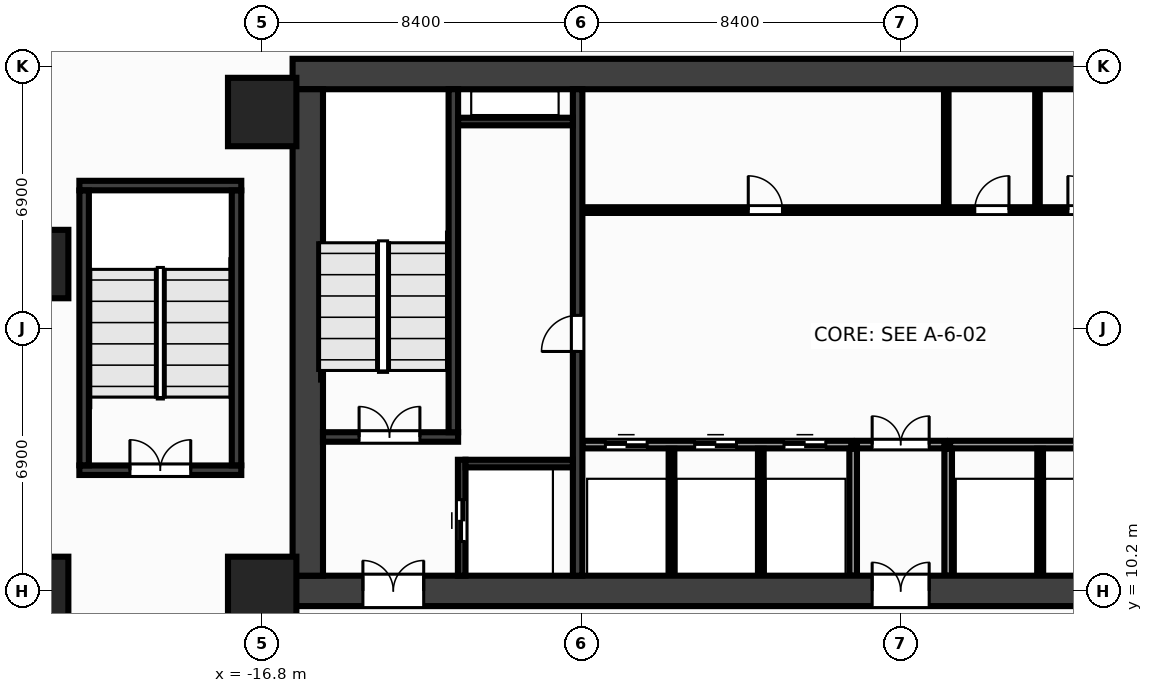
"""IFC4 building model, lengths in metres.
Left out: names, types, materials, properties, quantities, classifications, styles, units other than length and angle.
Written with IfcOpenShell. Run it as: python <this file> out.ifc"""

import sys

from ifc_helpers import new_model, si_unit, direction, frame, frame_2d, origin, origin_2d, place, context, subcontext, project, spatial, rectangle, extrude, source, transform, mapped, element, fill, save


model = new_model("IFC4")
c1 = context("Model", 3, precision=1e-05, world=origin(), true_north=direction((0.0, 1.0)))
c2 = subcontext(c1, "Body", "Model", "MODEL_VIEW")
j1 = project(units=[si_unit("LENGTHUNIT", "METRE"), si_unit("PLANEANGLEUNIT", "RADIAN")], contexts=[c1])
p1 = place(None, origin())
s1 = spatial("IfcSite", under=j1, at=p1, CompositionType="ELEMENT")
p2 = place(p1, origin())
s2 = spatial("IfcBuilding", under=s1, at=p2, CompositionType="ELEMENT")
p3 = place(p2, frame((0.0, 0.0, 14.3)))
s3 = spatial("IfcBuildingStorey", under=s2, at=p3, CompositionType="ELEMENT", Elevation=14.3)
m1 = source(origin(), c2, "Body", "SweptSolid", [
    extrude(rectangle(XDim=32.0, YDim=0.8, at=frame_2d((16.0, 0.0))), origin(), (0.0, 0.0, 1.0), 4.65),
])
p4 = place(p3, frame((-16.0, 23.8, 0.0), z_axis=(0.0, 0.0, 1.0), x_axis=(1.0, 0.0, 0.0)))
e1 = element("IfcWall", 1, at=p4, inside=s3, PredefinedType="SHEAR", context=c2, shape_type="MappedRepresentation", body=[
    mapped(m1, transform((0.0, 0.0, 0.0), x_axis=(1.0, 0.0, 0.0), y_axis=(0.0, 1.0, 0.0), z_axis=(0.0, 0.0, 1.0), scale=1.0)),
])
p5 = place(p3, frame((-16.0, 10.2, 0.0), z_axis=(0.0, 0.0, 1.0), x_axis=(1.0, 0.0, 0.0)))
e2 = element("IfcWall", 2, at=p5, inside=s3, PredefinedType="SHEAR", context=c2, shape_type="MappedRepresentation", body=[
    mapped(m1, transform((0.0, 0.0, 0.0), x_axis=(1.0, 0.0, 0.0), y_axis=(0.0, 1.0, 0.0), z_axis=(0.0, 0.0, 1.0), scale=1.0)),
])
p6 = place(p5, frame((1.85, 0.0, 0.0)))
e3 = element("IfcOpeningElement", 3, at=p6, cuts=e2, PredefinedType="OPENING", context=c2, shape_type="SweptSolid", body=[
    extrude(rectangle(XDim=1.6, YDim=2.15, at=frame_2d((0.8, 1.075))), frame((0.0, 0.412, 0.0), z_axis=(0.0, -1.0, 0.0), x_axis=(1.0, 0.0, 0.0)), (0.0, 0.0, 1.0), 0.824),
])
p7 = place(p5, frame((28.55, 0.0, 0.0)))
e4 = element("IfcOpeningElement", 4, at=p7, cuts=e2, PredefinedType="OPENING", context=c2, shape_type="SweptSolid", body=[
    extrude(rectangle(XDim=1.6, YDim=2.15, at=frame_2d((0.8, 1.075))), frame((0.0, 0.412, 0.0), z_axis=(0.0, -1.0, 0.0), x_axis=(1.0, 0.0, 0.0)), (0.0, 0.0, 1.0), 0.824),
])
p8 = place(p5, frame((15.25, 0.0, 0.0)))
e5 = element("IfcOpeningElement", 5, at=p8, cuts=e2, PredefinedType="OPENING", context=c2, shape_type="SweptSolid", body=[
    extrude(rectangle(XDim=1.5, YDim=2.2, at=frame_2d((0.75, 1.1))), frame((0.0, 0.412, 0.0), z_axis=(0.0, -1.0, 0.0), x_axis=(1.0, 0.0, 0.0)), (0.0, 0.0, 1.0), 0.824),
])
m2 = source(origin(), c2, "Body", "SweptSolid", [
    extrude(rectangle(XDim=12.8, YDim=0.8, at=frame_2d((6.4, 0.0))), origin(), (0.0, 0.0, 1.0), 4.65),
])
p9 = place(p3, frame((-15.6, 10.6, 0.0), z_axis=(0.0, 0.0, 1.0), x_axis=(0.0, 1.0, 0.0)))
e6 = element("IfcWall", 6, at=p9, inside=s3, PredefinedType="SHEAR", context=c2, shape_type="MappedRepresentation", body=[
    mapped(m2, transform((0.0, 0.0, 0.0), x_axis=(1.0, 0.0, 0.0), y_axis=(0.0, 1.0, 0.0), z_axis=(0.0, 0.0, 1.0), scale=1.0)),
])
m3 = source(origin(), c2, "Body", "SweptSolid", [
    extrude(rectangle(XDim=12.8, YDim=0.25, at=frame_2d((6.4, 0.0))), origin(), (0.0, 0.0, 1.0), 4.65),
])
p10 = place(p3, frame((-8.5, 10.6, 0.0), z_axis=(0.0, 0.0, 1.0), x_axis=(0.0, 1.0, 0.0)))
e7 = element("IfcWall", 7, at=p10, inside=s3, PredefinedType="SHEAR", context=c2, shape_type="MappedRepresentation", body=[
    mapped(m3, transform((0.0, 0.0, 0.0), x_axis=(1.0, 0.0, 0.0), y_axis=(0.0, 1.0, 0.0), z_axis=(0.0, 0.0, 1.0), scale=1.0)),
])
p11 = place(p10, frame((5.9, 0.0, 0.0)))
e8 = element("IfcOpeningElement", 8, at=p11, cuts=e7, PredefinedType="OPENING", context=c2, shape_type="SweptSolid", body=[
    extrude(rectangle(XDim=0.95, YDim=2.15, at=frame_2d((0.475, 1.075))), frame((0.0, 0.137, 0.0), z_axis=(0.0, -1.0, 0.0), x_axis=(1.0, 0.0, 0.0)), (0.0, 0.0, 1.0), 0.274),
])
m4 = source(origin(), c2, "Body", "SweptSolid", [
    extrude(rectangle(XDim=3.555, YDim=0.25, at=frame_2d((1.777, 0.0))), origin(), (0.0, 0.0, 1.0), 4.65),
])
p12 = place(p3, frame((-15.2, 14.25, 0.0), z_axis=(0.0, 0.0, 1.0), x_axis=(1.0, 0.0, 0.0)))
e9 = element("IfcWall", 9, at=p12, inside=s3, PredefinedType="SHEAR", context=c2, shape_type="MappedRepresentation", body=[
    mapped(m4, transform((0.0, 0.0, 0.0), x_axis=(1.0, 0.0, 0.0), y_axis=(0.0, 1.0, 0.0), z_axis=(0.0, 0.0, 1.0), scale=1.0)),
])
p13 = place(p12, frame((0.95, 0.0, 0.0)))
e10 = element("IfcOpeningElement", 10, at=p13, cuts=e9, PredefinedType="OPENING", context=c2, shape_type="SweptSolid", body=[
    extrude(rectangle(XDim=1.6, YDim=2.15, at=frame_2d((0.8, 1.075))), frame((0.0, 0.137, 0.0), z_axis=(0.0, -1.0, 0.0), x_axis=(1.0, 0.0, 0.0)), (0.0, 0.0, 1.0), 0.274),
])
m5 = source(origin(), c2, "Body", "SweptSolid", [
    extrude(rectangle(XDim=9.025, YDim=0.25, at=frame_2d((4.512, 0.0))), origin(), (0.0, 0.0, 1.0), 4.65),
])
p14 = place(p3, frame((-11.77, 14.375, 0.0), z_axis=(0.0, 0.0, 1.0), x_axis=(0.0, 1.0, 0.0)))
e11 = element("IfcWall", 11, at=p14, inside=s3, PredefinedType="SHEAR", context=c2, shape_type="MappedRepresentation", body=[
    mapped(m5, transform((0.0, 0.0, 0.0), x_axis=(1.0, 0.0, 0.0), y_axis=(0.0, 1.0, 0.0), z_axis=(0.0, 0.0, 1.0), scale=1.0)),
])
m6 = source(origin(), c2, "Body", "SweptSolid", [
    extrude(rectangle(XDim=3.05, YDim=0.2, at=frame_2d((1.525, 0.0))), origin(), (0.0, 0.0, 1.0), 4.65),
])
p15 = place(p3, frame((-11.55, 10.6, 0.0), z_axis=(0.0, 0.0, 1.0), x_axis=(0.0, 1.0, 0.0)))
e12 = element("IfcWall", 12, at=p15, inside=s3, PredefinedType="SHEAR", context=c2, shape_type="MappedRepresentation", body=[
    mapped(m6, transform((0.0, 0.0, 0.0), x_axis=(1.0, 0.0, 0.0), y_axis=(0.0, 1.0, 0.0), z_axis=(0.0, 0.0, 1.0), scale=1.0)),
])
p16 = place(p15, frame((0.9, 0.0, 0.0)))
e13 = element("IfcOpeningElement", 13, at=p16, cuts=e12, PredefinedType="OPENING", context=c2, shape_type="SweptSolid", body=[
    extrude(rectangle(XDim=1.1, YDim=2.15, at=frame_2d((0.55, 1.075))), frame((0.0, 0.112, 0.0), z_axis=(0.0, -1.0, 0.0), x_axis=(1.0, 0.0, 0.0)), (0.0, 0.0, 1.0), 0.224),
])
m7 = source(origin(), c2, "Body", "SweptSolid", [
    extrude(rectangle(XDim=2.825, YDim=0.2, at=frame_2d((1.413, 0.0))), origin(), (0.0, 0.0, 1.0), 4.65),
])
p17 = place(p3, frame((-11.45, 13.55, 0.0), z_axis=(0.0, 0.0, 1.0), x_axis=(1.0, 0.0, 0.0)))
e14 = element("IfcWall", 14, at=p17, inside=s3, PredefinedType="SHEAR", context=c2, shape_type="MappedRepresentation", body=[
    mapped(m7, transform((0.0, 0.0, 0.0), x_axis=(1.0, 0.0, 0.0), y_axis=(0.0, 1.0, 0.0), z_axis=(0.0, 0.0, 1.0), scale=1.0)),
])
m8 = source(origin(), c2, "Body", "SweptSolid", [
    extrude(rectangle(XDim=3.02, YDim=0.2, at=frame_2d((1.51, 0.0))), origin(), (0.0, 0.0, 1.0), 4.65),
])
p18 = place(p3, frame((-11.645, 22.55, 0.0), z_axis=(0.0, 0.0, 1.0), x_axis=(1.0, 0.0, 0.0)))
e15 = element("IfcWall", 15, at=p18, inside=s3, PredefinedType="SHEAR", context=c2, shape_type="MappedRepresentation", body=[
    mapped(m8, transform((0.0, 0.0, 0.0), x_axis=(1.0, 0.0, 0.0), y_axis=(0.0, 1.0, 0.0), z_axis=(0.0, 0.0, 1.0), scale=1.0)),
])
m9 = source(origin(), c2, "Body", "SweptSolid", [
    extrude(rectangle(XDim=4.26, YDim=0.25, at=frame_2d((2.13, 0.0))), origin(), (0.0, 0.0, 1.0), 4.65),
])
p19 = place(p3, frame((-21.61, 20.865, 0.0), z_axis=(0.0, 0.0, 1.0), x_axis=(1.0, 0.0, 0.0)))
e16 = element("IfcWall", 16, at=p19, inside=s3, PredefinedType="SHEAR", context=c2, shape_type="MappedRepresentation", body=[
    mapped(m9, transform((0.0, 0.0, 0.0), x_axis=(1.0, 0.0, 0.0), y_axis=(0.0, 1.0, 0.0), z_axis=(0.0, 0.0, 1.0), scale=1.0)),
])
p20 = place(p3, frame((-21.61, 13.375, 0.0), z_axis=(0.0, 0.0, 1.0), x_axis=(1.0, 0.0, 0.0)))
e17 = element("IfcWall", 17, at=p20, inside=s3, PredefinedType="SHEAR", context=c2, shape_type="MappedRepresentation", body=[
    mapped(m9, transform((0.0, 0.0, 0.0), x_axis=(1.0, 0.0, 0.0), y_axis=(0.0, 1.0, 0.0), z_axis=(0.0, 0.0, 1.0), scale=1.0)),
])
p21 = place(p20, frame((1.33, 0.0, 0.0)))
e18 = element("IfcOpeningElement", 18, at=p21, cuts=e17, PredefinedType="OPENING", context=c2, shape_type="SweptSolid", body=[
    extrude(rectangle(XDim=1.6, YDim=2.15, at=frame_2d((0.8, 1.075))), frame((0.0, 0.137, 0.0), z_axis=(0.0, -1.0, 0.0), x_axis=(1.0, 0.0, 0.0)), (0.0, 0.0, 1.0), 0.274),
])
m10 = source(origin(), c2, "Body", "SweptSolid", [
    extrude(rectangle(XDim=7.23, YDim=0.25, at=frame_2d((3.615, 0.0))), origin(), (0.0, 0.0, 1.0), 4.65),
])
for number, where, z_axis, x_axis in (
    (19, (-21.485, 13.505, 0.0), (0.0, 0.0, 1.0), (0.0, 1.0, 0.0)),
    (20, (-17.475, 13.505, 0.0), (0.0, 0.0, 1.0), (0.0, 1.0, 0.0)),
):
    element("IfcWall", number, at=place(p3, frame(where, z_axis=z_axis, x_axis=x_axis)), inside=s3, PredefinedType="SHEAR", context=c2, shape_type="MappedRepresentation", body=[
        mapped(m10, transform((0.0, 0.0, 0.0), x_axis=(1.0, 0.0, 0.0), y_axis=(0.0, 1.0, 0.0), z_axis=(0.0, 0.0, 1.0), scale=1.0)),
    ])
m11 = source(origin(), c2, "Body", "SweptSolid", [
    extrude(rectangle(XDim=1.8, YDim=1.8, at=origin_2d()), origin(), (0.0, 0.0, 1.0), 4.65),
])
for number, where, z_axis, x_axis in (
    (21, (-16.8, 10.2, 0.0), (0.0, 0.0, 1.0), (1.0, 0.0, 0.0)),
    (22, (-16.8, 22.8, 0.0), (0.0, 0.0, 1.0), (1.0, 0.0, 0.0)),
    (23, (-22.8, 10.2, 0.0), (0.0, 0.0, 1.0), (1.0, 0.0, 0.0)),
    (24, (-22.8, 18.8, 0.0), (0.0, 0.0, 1.0), (1.0, 0.0, 0.0)),
):
    element("IfcColumn", number, at=place(p3, frame(where, z_axis=z_axis, x_axis=x_axis)), inside=s3, PredefinedType="COLUMN", context=c2, shape_type="MappedRepresentation", body=[
        mapped(m11, transform((0.0, 0.0, 0.0), x_axis=(1.0, 0.0, 0.0), y_axis=(0.0, 1.0, 0.0), z_axis=(0.0, 0.0, 1.0), scale=1.0)),
    ])
m12 = source(origin(), c2, "Body", "SweptSolid", [
    extrude(rectangle(XDim=7.07, YDim=0.2, at=frame_2d((3.535, 0.0))), origin(), (0.0, 0.0, 1.0), 4.33),
])
p22 = place(p3, frame((-8.37, 14.05, 0.0), z_axis=(0.0, 0.0, 1.0), x_axis=(1.0, 0.0, 0.0)))
e25 = element("IfcWall", 25, at=p22, inside=s3, PredefinedType="PARTITIONING", context=c2, shape_type="MappedRepresentation", body=[
    mapped(m12, transform((0.0, 0.0, 0.0), x_axis=(1.0, 0.0, 0.0), y_axis=(0.0, 1.0, 0.0), z_axis=(0.0, 0.0, 1.0), scale=1.0)),
])
p23 = place(p22, frame((0.6, 0.0, 0.0)))
e26 = element("IfcOpeningElement", 26, at=p23, cuts=e25, PredefinedType="OPENING", context=c2, shape_type="SweptSolid", body=[
    extrude(rectangle(XDim=1.1, YDim=2.15, at=frame_2d((0.55, 1.075))), frame((0.0, 0.112, 0.0), z_axis=(0.0, -1.0, 0.0), x_axis=(1.0, 0.0, 0.0)), (0.0, 0.0, 1.0), 0.224),
])
p24 = place(p22, frame((2.95, 0.0, 0.0)))
e27 = element("IfcOpeningElement", 27, at=p24, cuts=e25, PredefinedType="OPENING", context=c2, shape_type="SweptSolid", body=[
    extrude(rectangle(XDim=1.1, YDim=2.15, at=frame_2d((0.55, 1.075))), frame((0.0, 0.112, 0.0), z_axis=(0.0, -1.0, 0.0), x_axis=(1.0, 0.0, 0.0)), (0.0, 0.0, 1.0), 0.224),
])
p25 = place(p22, frame((5.3, 0.0, 0.0)))
e28 = element("IfcOpeningElement", 28, at=p25, cuts=e25, PredefinedType="OPENING", context=c2, shape_type="SweptSolid", body=[
    extrude(rectangle(XDim=1.1, YDim=2.15, at=frame_2d((0.55, 1.075))), frame((0.0, 0.112, 0.0), z_axis=(0.0, -1.0, 0.0), x_axis=(1.0, 0.0, 0.0)), (0.0, 0.0, 1.0), 0.224),
])
p26 = place(p3, frame((1.3, 14.05, 0.0), z_axis=(0.0, 0.0, 1.0), x_axis=(1.0, 0.0, 0.0)))
e29 = element("IfcWall", 29, at=p26, inside=s3, PredefinedType="PARTITIONING", context=c2, shape_type="MappedRepresentation", body=[
    mapped(m12, transform((0.0, 0.0, 0.0), x_axis=(1.0, 0.0, 0.0), y_axis=(0.0, 1.0, 0.0), z_axis=(0.0, 0.0, 1.0), scale=1.0)),
])
m13 = source(origin(), c2, "Body", "SweptSolid", [
    extrude(rectangle(XDim=3.34, YDim=0.2, at=frame_2d((1.67, 0.0))), origin(), (0.0, 0.0, 1.0), 4.33),
])
for number, where, z_axis, x_axis in (
    (30, (-1.25, 10.6, 0.0), (0.0, 0.0, 1.0), (0.0, 1.0, 0.0)),
    (31, (1.25, 10.6, 0.0), (0.0, 0.0, 1.0), (0.0, 1.0, 0.0)),
):
    element("IfcWall", number, at=place(p3, frame(where, z_axis=z_axis, x_axis=x_axis)), inside=s3, PredefinedType="PARTITIONING", context=c2, shape_type="MappedRepresentation", body=[
        mapped(m13, transform((0.0, 0.0, 0.0), x_axis=(1.0, 0.0, 0.0), y_axis=(0.0, 1.0, 0.0), z_axis=(0.0, 0.0, 1.0), scale=1.0)),
    ])
m14 = source(origin(), c2, "Body", "SweptSolid", [
    extrude(rectangle(XDim=2.3, YDim=0.2, at=frame_2d((1.15, 0.0))), origin(), (0.0, 0.0, 1.0), 4.33),
])
p27 = place(p3, frame((-1.15, 14.05, 0.0), z_axis=(0.0, 0.0, 1.0), x_axis=(1.0, 0.0, 0.0)))
e32 = element("IfcWall", 32, at=p27, inside=s3, PredefinedType="PARTITIONING", context=c2, shape_type="MappedRepresentation", body=[
    mapped(m14, transform((0.0, 0.0, 0.0), x_axis=(1.0, 0.0, 0.0), y_axis=(0.0, 1.0, 0.0), z_axis=(0.0, 0.0, 1.0), scale=1.0)),
])
p28 = place(p27, frame((0.4, 0.0, 0.0)))
e33 = element("IfcOpeningElement", 33, at=p28, cuts=e32, PredefinedType="OPENING", context=c2, shape_type="SweptSolid", body=[
    extrude(rectangle(XDim=1.5, YDim=2.2, at=frame_2d((0.75, 1.1))), frame((0.0, 0.112, 0.0), z_axis=(0.0, -1.0, 0.0), x_axis=(1.0, 0.0, 0.0)), (0.0, 0.0, 1.0), 0.224),
])
m15 = source(origin(), c2, "Body", "SweptSolid", [
    extrude(rectangle(XDim=14.59, YDim=0.15, at=frame_2d((7.295, 0.0))), origin(), (0.0, 0.0, 1.0), 4.33),
])
p29 = place(p3, frame((-8.37, 20.22, 0.0), z_axis=(0.0, 0.0, 1.0), x_axis=(1.0, 0.0, 0.0)))
e34 = element("IfcWall", 34, at=p29, inside=s3, PredefinedType="PARTITIONING", context=c2, shape_type="MappedRepresentation", body=[
    mapped(m15, transform((0.0, 0.0, 0.0), x_axis=(1.0, 0.0, 0.0), y_axis=(0.0, 1.0, 0.0), z_axis=(0.0, 0.0, 1.0), scale=1.0)),
])
p30 = place(p29, frame((4.36, 0.0, 0.0)))
e35 = element("IfcOpeningElement", 35, at=p30, cuts=e34, PredefinedType="OPENING", context=c2, shape_type="SweptSolid", body=[
    extrude(rectangle(XDim=0.9, YDim=2.15, at=frame_2d((0.45, 1.075))), frame((0.0, 0.087, 0.0), z_axis=(0.0, -1.0, 0.0), x_axis=(1.0, 0.0, 0.0)), (0.0, 0.0, 1.0), 0.174),
])
p31 = place(p29, frame((10.32, 0.0, 0.0)))
e36 = element("IfcOpeningElement", 36, at=p31, cuts=e34, PredefinedType="OPENING", context=c2, shape_type="SweptSolid", body=[
    extrude(rectangle(XDim=0.9, YDim=2.15, at=frame_2d((0.45, 1.075))), frame((0.0, 0.087, 0.0), z_axis=(0.0, -1.0, 0.0), x_axis=(1.0, 0.0, 0.0)), (0.0, 0.0, 1.0), 0.174),
])
p32 = place(p29, frame((12.77, 0.0, 0.0)))
e37 = element("IfcOpeningElement", 37, at=p32, cuts=e34, PredefinedType="OPENING", context=c2, shape_type="SweptSolid", body=[
    extrude(rectangle(XDim=0.9, YDim=2.15, at=frame_2d((0.45, 1.075))), frame((0.0, 0.087, 0.0), z_axis=(0.0, -1.0, 0.0), x_axis=(1.0, 0.0, 0.0)), (0.0, 0.0, 1.0), 0.174),
])
m16 = source(origin(), c2, "Body", "SweptSolid", [
    extrude(rectangle(XDim=3.34, YDim=0.15, at=frame_2d((1.67, 0.0))), origin(), (0.0, 0.0, 1.0), 4.33),
])
for number, where, z_axis, x_axis in (
    (38, (-6.03, 10.6, 0.0), (0.0, 0.0, 1.0), (0.0, 1.0, 0.0)),
    (39, (-3.68, 10.6, 0.0), (0.0, 0.0, 1.0), (0.0, 1.0, 0.0)),
    (40, (3.67, 10.6, 0.0), (0.0, 0.0, 1.0), (0.0, 1.0, 0.0)),
):
    element("IfcWall", number, at=place(p3, frame(where, z_axis=z_axis, x_axis=x_axis)), inside=s3, PredefinedType="PARTITIONING", context=c2, shape_type="MappedRepresentation", body=[
        mapped(m16, transform((0.0, 0.0, 0.0), x_axis=(1.0, 0.0, 0.0), y_axis=(0.0, 1.0, 0.0), z_axis=(0.0, 0.0, 1.0), scale=1.0)),
    ])
m17 = source(origin(), c2, "Body", "SweptSolid", [
    extrude(rectangle(XDim=3.04, YDim=0.12, at=frame_2d((1.52, 0.0))), origin(), (0.0, 0.0, 1.0), 4.33),
])
for number, where, z_axis, x_axis in (
    (41, (1.2, 20.32, 0.0), (0.0, 0.0, 1.0), (0.0, 1.0, 0.0)),
    (42, (3.6, 20.32, 0.0), (0.0, 0.0, 1.0), (0.0, 1.0, 0.0)),
):
    element("IfcWall", number, at=place(p3, frame(where, z_axis=z_axis, x_axis=x_axis)), inside=s3, PredefinedType="PARTITIONING", context=c2, shape_type="MappedRepresentation", body=[
        mapped(m17, transform((0.0, 0.0, 0.0), x_axis=(1.0, 0.0, 0.0), y_axis=(0.0, 1.0, 0.0), z_axis=(0.0, 0.0, 1.0), scale=1.0)),
    ])
m18 = source(origin(), c2, "Body", "SweptSolid", [
    extrude(rectangle(XDim=1.6, YDim=2.15, at=frame_2d((0.8, 1.075))), frame((0.0, 0.025, 0.0), z_axis=(0.0, -1.0, 0.0), x_axis=(1.0, 0.0, 0.0)), (0.0, 0.0, 1.0), 0.05),
])
p33 = place(p13, origin())
e43 = element("IfcDoor", 43, at=p33, inside=s3, OperationType="DOUBLE_DOOR_SINGLE_SWING", PredefinedType="DOOR", context=c2, shape_type="MappedRepresentation", body=[
    mapped(m18, transform((0.0, 0.0, 0.0), x_axis=(1.0, 0.0, 0.0), y_axis=(0.0, 1.0, 0.0), z_axis=(0.0, 0.0, 1.0), scale=1.0)),
])
fill(e10, e43)
p34 = place(p6, origin())
e44 = element("IfcDoor", 44, at=p34, inside=s3, OperationType="DOUBLE_DOOR_SINGLE_SWING", PredefinedType="DOOR", context=c2, shape_type="MappedRepresentation", body=[
    mapped(m18, transform((0.0, 0.0, 0.0), x_axis=(1.0, 0.0, 0.0), y_axis=(0.0, 1.0, 0.0), z_axis=(0.0, 0.0, 1.0), scale=1.0)),
])
fill(e3, e44)
m19 = source(origin(), c2, "Body", "SweptSolid", [
    extrude(rectangle(XDim=1.1, YDim=2.15, at=frame_2d((0.55, 1.075))), frame((0.0, 0.025, 0.0), z_axis=(0.0, -1.0, 0.0), x_axis=(1.0, 0.0, 0.0)), (0.0, 0.0, 1.0), 0.05),
])
p35 = place(p16, origin())
e45 = element("IfcDoor", 45, at=p35, inside=s3, OperationType="DOUBLE_DOOR_SLIDING", PredefinedType="DOOR", context=c2, shape_type="MappedRepresentation", body=[
    mapped(m19, transform((0.0, 0.0, 0.0), x_axis=(1.0, 0.0, 0.0), y_axis=(0.0, 1.0, 0.0), z_axis=(0.0, 0.0, 1.0), scale=1.0)),
])
fill(e13, e45)
p36 = place(p21, origin())
e46 = element("IfcDoor", 46, at=p36, inside=s3, OperationType="DOUBLE_DOOR_SINGLE_SWING", PredefinedType="DOOR", context=c2, shape_type="MappedRepresentation", body=[
    mapped(m18, transform((0.0, 0.0, 0.0), x_axis=(1.0, 0.0, 0.0), y_axis=(0.0, 1.0, 0.0), z_axis=(0.0, 0.0, 1.0), scale=1.0)),
])
fill(e18, e46)
m20 = source(origin(), c2, "Body", "SweptSolid", [
    extrude(rectangle(XDim=0.95, YDim=2.15, at=frame_2d((0.475, 1.075))), frame((0.0, 0.025, 0.0), z_axis=(0.0, -1.0, 0.0), x_axis=(1.0, 0.0, 0.0)), (0.0, 0.0, 1.0), 0.05),
])
p37 = place(p11, origin())
e47 = element("IfcDoor", 47, at=p37, inside=s3, OperationType="SINGLE_SWING_LEFT", PredefinedType="DOOR", context=c2, shape_type="MappedRepresentation", body=[
    mapped(m20, transform((0.0, 0.0, 0.0), x_axis=(1.0, 0.0, 0.0), y_axis=(0.0, 1.0, 0.0), z_axis=(0.0, 0.0, 1.0), scale=1.0)),
])
fill(e8, e47)
p38 = place(p23, origin())
e48 = element("IfcDoor", 48, at=p38, inside=s3, OperationType="DOUBLE_DOOR_SLIDING", PredefinedType="DOOR", context=c2, shape_type="MappedRepresentation", body=[
    mapped(m19, transform((0.0, 0.0, 0.0), x_axis=(1.0, 0.0, 0.0), y_axis=(0.0, 1.0, 0.0), z_axis=(0.0, 0.0, 1.0), scale=1.0)),
])
fill(e26, e48)
p39 = place(p24, origin())
e49 = element("IfcDoor", 49, at=p39, inside=s3, OperationType="DOUBLE_DOOR_SLIDING", PredefinedType="DOOR", context=c2, shape_type="MappedRepresentation", body=[
    mapped(m19, transform((0.0, 0.0, 0.0), x_axis=(1.0, 0.0, 0.0), y_axis=(0.0, 1.0, 0.0), z_axis=(0.0, 0.0, 1.0), scale=1.0)),
])
fill(e27, e49)
p40 = place(p25, origin())
e50 = element("IfcDoor", 50, at=p40, inside=s3, OperationType="DOUBLE_DOOR_SLIDING", PredefinedType="DOOR", context=c2, shape_type="MappedRepresentation", body=[
    mapped(m19, transform((0.0, 0.0, 0.0), x_axis=(1.0, 0.0, 0.0), y_axis=(0.0, 1.0, 0.0), z_axis=(0.0, 0.0, 1.0), scale=1.0)),
])
fill(e28, e50)
m21 = source(origin(), c2, "Body", "SweptSolid", [
    extrude(rectangle(XDim=1.5, YDim=2.2, at=frame_2d((0.75, 1.1))), frame((0.0, 0.025, 0.0), z_axis=(0.0, -1.0, 0.0), x_axis=(1.0, 0.0, 0.0)), (0.0, 0.0, 1.0), 0.05),
])
p41 = place(p28, origin())
e51 = element("IfcDoor", 51, at=p41, inside=s3, OperationType="DOUBLE_DOOR_SINGLE_SWING", PredefinedType="DOOR", context=c2, shape_type="MappedRepresentation", body=[
    mapped(m21, transform((0.0, 0.0, 0.0), x_axis=(1.0, 0.0, 0.0), y_axis=(0.0, 1.0, 0.0), z_axis=(0.0, 0.0, 1.0), scale=1.0)),
])
fill(e33, e51)
p42 = place(p8, origin())
e52 = element("IfcDoor", 52, at=p42, inside=s3, OperationType="DOUBLE_DOOR_SINGLE_SWING", PredefinedType="DOOR", context=c2, shape_type="MappedRepresentation", body=[
    mapped(m21, transform((0.0, 0.0, 0.0), x_axis=(1.0, 0.0, 0.0), y_axis=(0.0, 1.0, 0.0), z_axis=(0.0, 0.0, 1.0), scale=1.0)),
])
fill(e5, e52)
m22 = source(origin(), c2, "Body", "SweptSolid", [
    extrude(rectangle(XDim=0.9, YDim=2.15, at=frame_2d((0.45, 1.075))), frame((0.0, 0.025, 0.0), z_axis=(0.0, -1.0, 0.0), x_axis=(1.0, 0.0, 0.0)), (0.0, 0.0, 1.0), 0.05),
])
p43 = place(p30, origin())
e53 = element("IfcDoor", 53, at=p43, inside=s3, OperationType="SINGLE_SWING_LEFT", PredefinedType="DOOR", context=c2, shape_type="MappedRepresentation", body=[
    mapped(m22, transform((0.0, 0.0, 0.0), x_axis=(1.0, 0.0, 0.0), y_axis=(0.0, 1.0, 0.0), z_axis=(0.0, 0.0, 1.0), scale=1.0)),
])
fill(e35, e53)
p44 = place(p31, origin())
e54 = element("IfcDoor", 54, at=p44, inside=s3, OperationType="SINGLE_SWING_RIGHT", PredefinedType="DOOR", context=c2, shape_type="MappedRepresentation", body=[
    mapped(m22, transform((0.0, 0.0, 0.0), x_axis=(1.0, 0.0, 0.0), y_axis=(0.0, 1.0, 0.0), z_axis=(0.0, 0.0, 1.0), scale=1.0)),
])
fill(e36, e54)
p45 = place(p32, origin())
e55 = element("IfcDoor", 55, at=p45, inside=s3, OperationType="SINGLE_SWING_LEFT", PredefinedType="DOOR", context=c2, shape_type="MappedRepresentation", body=[
    mapped(m22, transform((0.0, 0.0, 0.0), x_axis=(1.0, 0.0, 0.0), y_axis=(0.0, 1.0, 0.0), z_axis=(0.0, 0.0, 1.0), scale=1.0)),
])
fill(e37, e55)
save(model, sys.argv[1])
